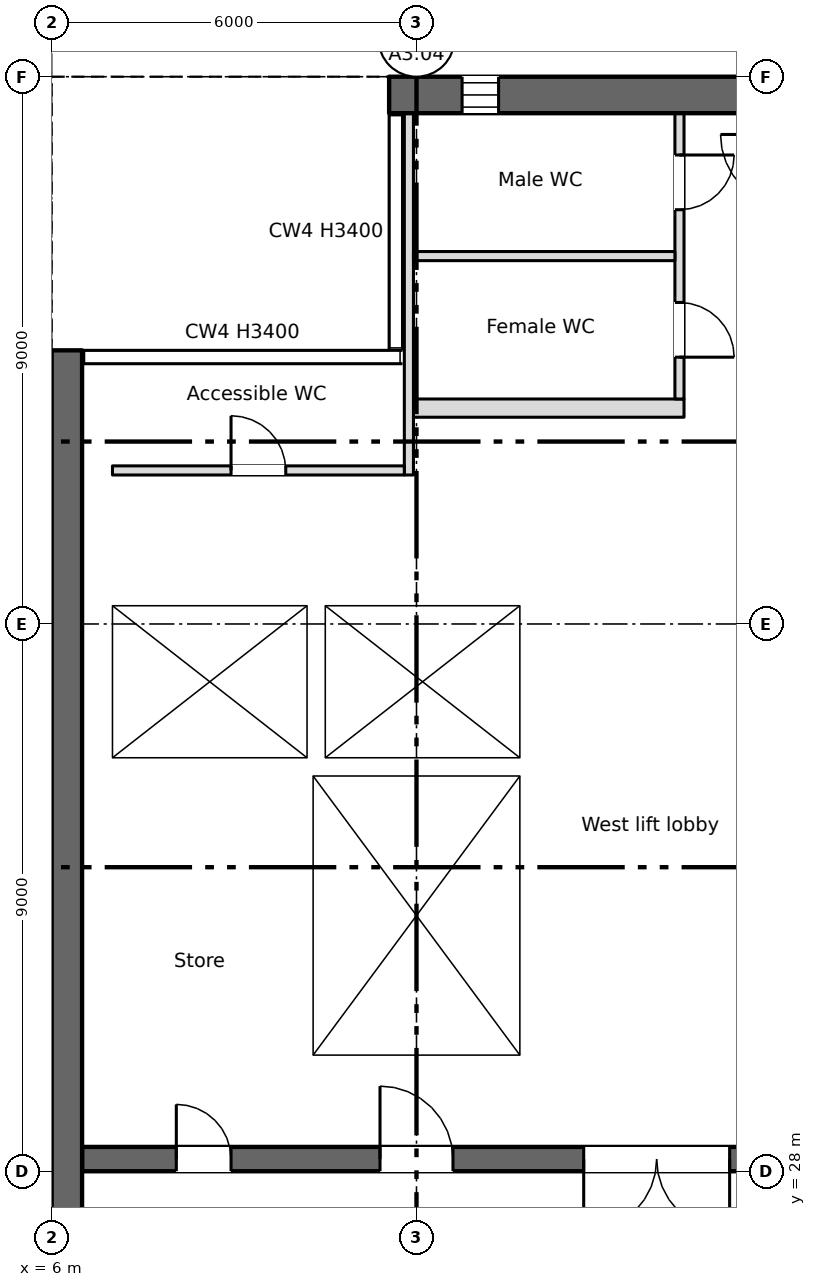
"""IFC4 building model, lengths in metres.
Left out: names, types, materials, properties, quantities, classifications, styles, units other than length and angle.
Written with IfcOpenShell. Run it as: python <this file> out.ifc"""

import sys

from ifc_helpers import new_model, si_unit, direction, frame, frame_2d, origin, place, context, subcontext, project, spatial, rectangle, extrude, element, fill, save


model = new_model("IFC4")
c1 = context("Model", 3, precision=1e-05, world=origin(), true_north=direction((0.0, 1.0)))
c2 = subcontext(c1, "Body", "Model", "MODEL_VIEW")
j1 = project(units=[si_unit("LENGTHUNIT", "METRE"), si_unit("PLANEANGLEUNIT", "RADIAN")], contexts=[c1])
p1 = place(None, origin())
s1 = spatial("IfcSite", under=j1, at=p1, CompositionType="ELEMENT")
p2 = place(p1, origin())
s2 = spatial("IfcBuilding", under=s1, at=p2, CompositionType="ELEMENT")
p3 = place(p2, frame((0.0, 0.0, 246.95)))
s3 = spatial("IfcBuildingStorey", under=s2, at=p3, CompositionType="ELEMENT", Elevation=246.95)
p4 = place(p3, frame((6.25, 8.5, 0.0), z_axis=(0.0, 0.0, 1.0), x_axis=(0.0, 1.0, 0.0)))
e1 = element("IfcWall", 1, at=p4, inside=s3, PredefinedType="SHEAR", context=c2, shape_type="SweptSolid", body=[
    extrude(rectangle(XDim=33.0, YDim=0.5, at=frame_2d((16.5, 0.0))), origin(), (0.0, 0.0, 1.0), 3.4),
])
p5 = place(p4, frame((1.2, 0.0, 0.6)))
e2 = element("IfcOpeningElement", 2, at=p5, cuts=e1, PredefinedType="OPENING", context=c2, shape_type="SweptSolid", body=[
    extrude(rectangle(XDim=0.6, YDim=2.4, at=frame_2d((0.3, 1.2))), frame((0.0, 0.26, 0.0), z_axis=(0.0, -1.0, 0.0), x_axis=(1.0, 0.0, 0.0)), (0.0, 0.0, 1.0), 0.52),
])
p6 = place(p4, frame((7.2, 0.0, 0.6)))
e3 = element("IfcOpeningElement", 3, at=p6, cuts=e1, PredefinedType="OPENING", context=c2, shape_type="SweptSolid", body=[
    extrude(rectangle(XDim=0.6, YDim=2.4, at=frame_2d((0.3, 1.2))), frame((0.0, 0.26, 0.0), z_axis=(0.0, -1.0, 0.0), x_axis=(1.0, 0.0, 0.0)), (0.0, 0.0, 1.0), 0.52),
])
p7 = place(p4, frame((13.2, 0.0, 0.6)))
e4 = element("IfcOpeningElement", 4, at=p7, cuts=e1, PredefinedType="OPENING", context=c2, shape_type="SweptSolid", body=[
    extrude(rectangle(XDim=0.6, YDim=2.4, at=frame_2d((0.3, 1.2))), frame((0.0, 0.26, 0.0), z_axis=(0.0, -1.0, 0.0), x_axis=(1.0, 0.0, 0.0)), (0.0, 0.0, 1.0), 0.52),
])
p8 = place(p3, frame((11.55, 45.7, 0.0), z_axis=(0.0, 0.0, 1.0), x_axis=(1.0, 0.0, 0.0)))
e5 = element("IfcWall", 5, at=p8, inside=s3, PredefinedType="SHEAR", context=c2, shape_type="SweptSolid", body=[
    extrude(rectangle(XDim=48.9, YDim=0.6, at=frame_2d((24.45, 0.0))), origin(), (0.0, 0.0, 1.0), 3.4),
])
p9 = place(p8, frame((1.2, 0.0, 0.6)))
e6 = element("IfcOpeningElement", 6, at=p9, cuts=e5, PredefinedType="OPENING", context=c2, shape_type="SweptSolid", body=[
    extrude(rectangle(XDim=0.6, YDim=2.4, at=frame_2d((0.3, 1.2))), frame((0.0, 0.31, 0.0), z_axis=(0.0, -1.0, 0.0), x_axis=(1.0, 0.0, 0.0)), (0.0, 0.0, 1.0), 0.62),
])
p10 = place(p3, frame((6.5, 28.2, 0.0), z_axis=(0.0, 0.0, 1.0), x_axis=(1.0, 0.0, 0.0)))
e7 = element("IfcWall", 7, at=p10, inside=s3, PredefinedType="SHEAR", context=c2, shape_type="SweptSolid", body=[
    extrude(rectangle(XDim=58.0, YDim=0.4, at=frame_2d((29.0, 0.0))), origin(), (0.0, 0.0, 1.0), 3.4),
])
p11 = place(p10, frame((14.05, 0.0, 0.0)))
e8 = element("IfcOpeningElement", 8, at=p11, cuts=e7, PredefinedType="OPENING", context=c2, shape_type="SweptSolid", body=[
    extrude(rectangle(XDim=0.9, YDim=2.1, at=frame_2d((0.45, 1.05))), frame((0.0, 0.21, 0.0), z_axis=(0.0, -1.0, 0.0), x_axis=(1.0, 0.0, 0.0)), (0.0, 0.0, 1.0), 0.42),
])
p12 = place(p10, frame((48.762, 0.0, 0.0)))
e9 = element("IfcOpeningElement", 9, at=p12, cuts=e7, PredefinedType="OPENING", context=c2, shape_type="SweptSolid", body=[
    extrude(rectangle(XDim=0.9, YDim=2.1, at=frame_2d((0.45, 1.05))), frame((0.0, 0.21, 0.0), z_axis=(0.0, -1.0, 0.0), x_axis=(1.0, 0.0, 0.0)), (0.0, 0.0, 1.0), 0.42),
])
p13 = place(p10, frame((51.337, 0.0, 0.0)))
e10 = element("IfcOpeningElement", 10, at=p13, cuts=e7, PredefinedType="OPENING", context=c2, shape_type="SweptSolid", body=[
    extrude(rectangle(XDim=0.9, YDim=2.1, at=frame_2d((0.45, 1.05))), frame((0.0, 0.21, 0.0), z_axis=(0.0, -1.0, 0.0), x_axis=(1.0, 0.0, 0.0)), (0.0, 0.0, 1.0), 0.42),
])
p14 = place(p10, frame((1.55, 0.0, 0.0)))
e11 = element("IfcOpeningElement", 11, at=p14, cuts=e7, PredefinedType="OPENING", context=c2, shape_type="SweptSolid", body=[
    extrude(rectangle(XDim=0.9, YDim=2.1, at=frame_2d((0.45, 1.05))), frame((0.0, 0.21, 0.0), z_axis=(0.0, -1.0, 0.0), x_axis=(1.0, 0.0, 0.0)), (0.0, 0.0, 1.0), 0.42),
])
p15 = place(p10, frame((4.9, 0.0, 0.0)))
e12 = element("IfcOpeningElement", 12, at=p15, cuts=e7, PredefinedType="OPENING", context=c2, shape_type="SweptSolid", body=[
    extrude(rectangle(XDim=1.2, YDim=2.1, at=frame_2d((0.6, 1.05))), frame((0.0, 0.21, 0.0), z_axis=(0.0, -1.0, 0.0), x_axis=(1.0, 0.0, 0.0)), (0.0, 0.0, 1.0), 0.42),
])
p16 = place(p10, frame((31.9, 0.0, 0.0)))
e13 = element("IfcOpeningElement", 13, at=p16, cuts=e7, PredefinedType="OPENING", context=c2, shape_type="SweptSolid", body=[
    extrude(rectangle(XDim=1.2, YDim=2.1, at=frame_2d((0.6, 1.05))), frame((0.0, 0.21, 0.0), z_axis=(0.0, -1.0, 0.0), x_axis=(1.0, 0.0, 0.0)), (0.0, 0.0, 1.0), 0.42),
])
p17 = place(p10, frame((55.4, 0.0, 0.0)))
e14 = element("IfcOpeningElement", 14, at=p17, cuts=e7, PredefinedType="OPENING", context=c2, shape_type="SweptSolid", body=[
    extrude(rectangle(XDim=1.2, YDim=2.1, at=frame_2d((0.6, 1.05))), frame((0.0, 0.21, 0.0), z_axis=(0.0, -1.0, 0.0), x_axis=(1.0, 0.0, 0.0)), (0.0, 0.0, 1.0), 0.42),
])
p18 = place(p10, frame((21.9, 0.0, 0.0)))
e15 = element("IfcOpeningElement", 15, at=p18, cuts=e7, PredefinedType="OPENING", context=c2, shape_type="SweptSolid", body=[
    extrude(rectangle(XDim=1.2, YDim=2.1, at=frame_2d((0.6, 1.05))), frame((0.0, 0.21, 0.0), z_axis=(0.0, -1.0, 0.0), x_axis=(1.0, 0.0, 0.0)), (0.0, 0.0, 1.0), 0.42),
])
p19 = place(p10, frame((41.9, 0.0, 0.0)))
e16 = element("IfcOpeningElement", 16, at=p19, cuts=e7, PredefinedType="OPENING", context=c2, shape_type="SweptSolid", body=[
    extrude(rectangle(XDim=1.2, YDim=2.1, at=frame_2d((0.6, 1.05))), frame((0.0, 0.21, 0.0), z_axis=(0.0, -1.0, 0.0), x_axis=(1.0, 0.0, 0.0)), (0.0, 0.0, 1.0), 0.42),
])
p20 = place(p10, frame((25.05, 0.0, 0.0)))
e17 = element("IfcOpeningElement", 17, at=p20, cuts=e7, PredefinedType="OPENING", context=c2, shape_type="SweptSolid", body=[
    extrude(rectangle(XDim=2.4, YDim=2.1, at=frame_2d((1.2, 1.05))), frame((0.0, 0.21, 0.0), z_axis=(0.0, -1.0, 0.0), x_axis=(1.0, 0.0, 0.0)), (0.0, 0.0, 1.0), 0.42),
])
p21 = place(p10, frame((37.55, 0.0, 0.0)))
e18 = element("IfcOpeningElement", 18, at=p21, cuts=e7, PredefinedType="OPENING", context=c2, shape_type="SweptSolid", body=[
    extrude(rectangle(XDim=2.4, YDim=2.1, at=frame_2d((1.2, 1.05))), frame((0.0, 0.21, 0.0), z_axis=(0.0, -1.0, 0.0), x_axis=(1.0, 0.0, 0.0)), (0.0, 0.0, 1.0), 0.42),
])
p22 = place(p10, frame((8.25, 0.0, 0.0)))
e19 = element("IfcOpeningElement", 19, at=p22, cuts=e7, PredefinedType="OPENING", context=c2, shape_type="SweptSolid", body=[
    extrude(rectangle(XDim=2.4, YDim=2.1, at=frame_2d((1.2, 1.05))), frame((0.0, 0.21, 0.0), z_axis=(0.0, -1.0, 0.0), x_axis=(1.0, 0.0, 0.0)), (0.0, 0.0, 1.0), 0.42),
])
p23 = place(p10, frame((29.05, 0.0, 0.0)))
e20 = element("IfcOpeningElement", 20, at=p23, cuts=e7, PredefinedType="OPENING", context=c2, shape_type="SweptSolid", body=[
    extrude(rectangle(XDim=0.9, YDim=2.1, at=frame_2d((0.45, 1.05))), frame((0.0, 0.21, 0.0), z_axis=(0.0, -1.0, 0.0), x_axis=(1.0, 0.0, 0.0)), (0.0, 0.0, 1.0), 0.42),
])
p24 = place(p10, frame((35.05, 0.0, 0.0)))
e21 = element("IfcOpeningElement", 21, at=p24, cuts=e7, PredefinedType="OPENING", context=c2, shape_type="SweptSolid", body=[
    extrude(rectangle(XDim=0.9, YDim=2.1, at=frame_2d((0.45, 1.05))), frame((0.0, 0.21, 0.0), z_axis=(0.0, -1.0, 0.0), x_axis=(1.0, 0.0, 0.0)), (0.0, 0.0, 1.0), 0.42),
])
p25 = place(p3, frame((6.75, 28.4, 0.0), z_axis=(0.0, 0.0, 1.0), x_axis=(0.0, 1.0, 0.0)))
e22 = element("IfcWall", 22, at=p25, inside=s3, PredefinedType="SHEAR", context=c2, shape_type="SweptSolid", body=[
    extrude(rectangle(XDim=12.85, YDim=0.5, at=frame_2d((6.425, 0.0))), origin(), (0.0, 0.0, 1.0), 3.4),
])
for number, where, z_axis, x_axis in (
    (23, (10.15, 28.4, 0.0), (0.0, 0.0, 1.0), (0.0, 1.0, 0.0)),
    (24, (13.85, 28.4, 0.0), (0.0, 0.0, 1.0), (0.0, 1.0, 0.0)),
):
    element("IfcWall", number, at=place(p3, frame(where, z_axis=z_axis, x_axis=x_axis)), inside=s3, PredefinedType="SHEAR", context=c2, shape_type="SweptSolid", body=[
        extrude(rectangle(XDim=6.1, YDim=0.3, at=frame_2d((3.05, 0.0))), origin(), (0.0, 0.0, 1.0), 3.4),
    ])
p26 = place(p3, frame((7.0, 34.65, 0.0), z_axis=(0.0, 0.0, 1.0), x_axis=(1.0, 0.0, 0.0)))
e25 = element("IfcWall", 25, at=p26, inside=s3, PredefinedType="SHEAR", context=c2, shape_type="SweptSolid", body=[
    extrude(rectangle(XDim=7.0, YDim=0.3, at=frame_2d((3.5, 0.0))), origin(), (0.0, 0.0, 1.0), 3.4),
])
p27 = place(p3, frame((7.0, 37.45, 0.0), z_axis=(0.0, 0.0, 1.0), x_axis=(1.0, 0.0, 0.0)))
e26 = element("IfcWall", 26, at=p27, inside=s3, PredefinedType="SHEAR", context=c2, shape_type="SweptSolid", body=[
    extrude(rectangle(XDim=7.0, YDim=0.3, at=frame_2d((3.5, 0.0))), origin(), (0.0, 0.0, 1.0), 3.4),
])
p28 = place(p27, frame((1.05, 0.0, 0.0)))
e27 = element("IfcOpeningElement", 27, at=p28, cuts=e26, PredefinedType="OPENING", context=c2, shape_type="SweptSolid", body=[
    extrude(rectangle(XDim=1.1, YDim=2.1, at=frame_2d((0.55, 1.05))), frame((0.0, 0.16, 0.0), z_axis=(0.0, -1.0, 0.0), x_axis=(1.0, 0.0, 0.0)), (0.0, 0.0, 1.0), 0.32),
])
p29 = place(p27, frame((4.55, 0.0, 0.0)))
e28 = element("IfcOpeningElement", 28, at=p29, cuts=e26, PredefinedType="OPENING", context=c2, shape_type="SweptSolid", body=[
    extrude(rectangle(XDim=1.1, YDim=2.1, at=frame_2d((0.55, 1.05))), frame((0.0, 0.16, 0.0), z_axis=(0.0, -1.0, 0.0), x_axis=(1.0, 0.0, 0.0)), (0.0, 0.0, 1.0), 0.32),
])
p30 = place(p3, frame((13.85, 34.8, 0.0), z_axis=(0.0, 0.0, 1.0), x_axis=(0.0, 1.0, 0.0)))
e29 = element("IfcWall", 29, at=p30, inside=s3, PredefinedType="SHEAR", context=c2, shape_type="SweptSolid", body=[
    extrude(rectangle(XDim=2.5, YDim=0.3, at=frame_2d((1.25, 0.0))), origin(), (0.0, 0.0, 1.0), 3.4),
])
p31 = place(p3, frame((11.95, 40.55, 0.0), z_axis=(0.0, 0.0, 1.0), x_axis=(1.0, 0.0, 0.0)))
e30 = element("IfcWall", 30, at=p31, inside=s3, PredefinedType="PARTITIONING", context=c2, shape_type="SweptSolid", body=[
    extrude(rectangle(XDim=4.45, YDim=0.3, at=frame_2d((2.225, 0.0))), origin(), (0.0, 0.0, 1.0), 3.4),
])
p32 = place(p3, frame((10.35, 34.8, 0.0), z_axis=(0.0, 0.0, 1.0), x_axis=(0.0, 1.0, 0.0)))
e31 = element("IfcWall", 31, at=p32, inside=s3, PredefinedType="SHEAR", context=c2, shape_type="SweptSolid", body=[
    extrude(rectangle(XDim=2.5, YDim=0.3, at=frame_2d((1.25, 0.0))), origin(), (0.0, 0.0, 1.0), 3.4),
])
p33 = place(p3, frame((16.325, 45.4, 0.0), z_axis=(0.0, 0.0, 1.0), x_axis=(0.0, -1.0, 0.0)))
e32 = element("IfcWall", 32, at=p33, inside=s3, PredefinedType="PARTITIONING", context=c2, shape_type="SweptSolid", body=[
    extrude(rectangle(XDim=4.7, YDim=0.15, at=frame_2d((2.35, 0.0))), origin(), (0.0, 0.0, 1.0), 3.4),
])
p34 = place(p33, frame((3.113, 0.0, 0.0)))
e33 = element("IfcOpeningElement", 33, at=p34, cuts=e32, PredefinedType="OPENING", context=c2, shape_type="SweptSolid", body=[
    extrude(rectangle(XDim=0.9, YDim=2.1, at=frame_2d((0.45, 1.05))), frame((0.0, 0.085, 0.0), z_axis=(0.0, -1.0, 0.0), x_axis=(1.0, 0.0, 0.0)), (0.0, 0.0, 1.0), 0.17),
])
p35 = place(p33, frame((0.688, 0.0, 0.0)))
e34 = element("IfcOpeningElement", 34, at=p35, cuts=e32, PredefinedType="OPENING", context=c2, shape_type="SweptSolid", body=[
    extrude(rectangle(XDim=0.9, YDim=2.1, at=frame_2d((0.45, 1.05))), frame((0.0, 0.085, 0.0), z_axis=(0.0, -1.0, 0.0), x_axis=(1.0, 0.0, 0.0)), (0.0, 0.0, 1.0), 0.17),
])
p36 = place(p3, frame((11.875, 39.45, 0.0), z_axis=(0.0, 0.0, 1.0), x_axis=(0.0, 1.0, 0.0)))
e35 = element("IfcWall", 35, at=p36, inside=s3, PredefinedType="PARTITIONING", context=c2, shape_type="SweptSolid", body=[
    extrude(rectangle(XDim=5.95, YDim=0.15, at=frame_2d((2.975, 0.0))), origin(), (0.0, 0.0, 1.0), 3.4),
])
p37 = place(p3, frame((7.0, 39.525, 0.0), z_axis=(0.0, 0.0, 1.0), x_axis=(1.0, 0.0, 0.0)))
e36 = element("IfcWall", 36, at=p37, inside=s3, PredefinedType="PARTITIONING", context=c2, shape_type="SweptSolid", body=[
    extrude(rectangle(XDim=4.8, YDim=0.15, at=frame_2d((2.4, 0.0))), origin(), (0.0, 0.0, 1.0), 3.4),
])
p38 = place(p37, frame((1.95, 0.0, 0.0)))
e37 = element("IfcOpeningElement", 37, at=p38, cuts=e36, PredefinedType="OPENING", context=c2, shape_type="SweptSolid", body=[
    extrude(rectangle(XDim=0.9, YDim=2.1, at=frame_2d((0.45, 1.05))), frame((0.0, 0.085, 0.0), z_axis=(0.0, -1.0, 0.0), x_axis=(1.0, 0.0, 0.0)), (0.0, 0.0, 1.0), 0.17),
])
p39 = place(p3, frame((11.95, 43.05, 0.0), z_axis=(0.0, 0.0, 1.0), x_axis=(1.0, 0.0, 0.0)))
e38 = element("IfcWall", 38, at=p39, inside=s3, PredefinedType="PARTITIONING", context=c2, shape_type="SweptSolid", body=[
    extrude(rectangle(XDim=4.3, YDim=0.15, at=frame_2d((2.15, 0.0))), origin(), (0.0, 0.0, 1.0), 3.4),
])
p40 = place(p9, origin())
e39 = element("IfcWindow", 39, at=p40, inside=s3, PartitioningType="SINGLE_PANEL", PredefinedType="WINDOW", context=c2, shape_type="SweptSolid", body=[
    extrude(rectangle(XDim=0.6, YDim=2.4, at=frame_2d((0.3, 1.2))), frame((0.0, 0.03, 0.0), z_axis=(0.0, -1.0, 0.0), x_axis=(1.0, 0.0, 0.0)), (0.0, 0.0, 1.0), 0.06),
])
fill(e6, e39)
p41 = place(p14, origin())
e40 = element("IfcDoor", 40, at=p41, inside=s3, OperationType="SINGLE_SWING_LEFT", PredefinedType="DOOR", context=c2, shape_type="SweptSolid", body=[
    extrude(rectangle(XDim=0.9, YDim=2.1, at=frame_2d((0.45, 1.05))), frame((0.0, 0.025, 0.0), z_axis=(0.0, -1.0, 0.0), x_axis=(1.0, 0.0, 0.0)), (0.0, 0.0, 1.0), 0.05),
])
fill(e11, e40)
p42 = place(p38, origin())
e41 = element("IfcDoor", 41, at=p42, inside=s3, OperationType="SINGLE_SWING_LEFT", PredefinedType="DOOR", context=c2, shape_type="SweptSolid", body=[
    extrude(rectangle(XDim=0.9, YDim=2.1, at=frame_2d((0.45, 1.05))), frame((0.0, 0.025, 0.0), z_axis=(0.0, -1.0, 0.0), x_axis=(1.0, 0.0, 0.0)), (0.0, 0.0, 1.0), 0.05),
])
fill(e37, e41)
p43 = place(p34, origin())
e42 = element("IfcDoor", 42, at=p43, inside=s3, OperationType="SINGLE_SWING_RIGHT", PredefinedType="DOOR", context=c2, shape_type="SweptSolid", body=[
    extrude(rectangle(XDim=0.9, YDim=2.1, at=frame_2d((0.45, 1.05))), frame((0.0, 0.025, 0.0), z_axis=(0.0, -1.0, 0.0), x_axis=(1.0, 0.0, 0.0)), (0.0, 0.0, 1.0), 0.05),
])
fill(e33, e42)
p44 = place(p35, origin())
e43 = element("IfcDoor", 43, at=p44, inside=s3, OperationType="SINGLE_SWING_LEFT", PredefinedType="DOOR", context=c2, shape_type="SweptSolid", body=[
    extrude(rectangle(XDim=0.9, YDim=2.1, at=frame_2d((0.45, 1.05))), frame((0.0, 0.025, 0.0), z_axis=(0.0, -1.0, 0.0), x_axis=(1.0, 0.0, 0.0)), (0.0, 0.0, 1.0), 0.05),
])
fill(e34, e43)
p45 = place(p28, origin())
e44 = element("IfcDoor", 44, at=p45, inside=s3, OperationType="SLIDING_TO_LEFT", PredefinedType="DOOR", context=c2, shape_type="SweptSolid", body=[
    extrude(rectangle(XDim=1.1, YDim=2.1, at=frame_2d((0.55, 1.05))), frame((0.0, 0.025, 0.0), z_axis=(0.0, -1.0, 0.0), x_axis=(1.0, 0.0, 0.0)), (0.0, 0.0, 1.0), 0.05),
])
fill(e27, e44)
p46 = place(p29, origin())
e45 = element("IfcDoor", 45, at=p46, inside=s3, OperationType="SLIDING_TO_LEFT", PredefinedType="DOOR", context=c2, shape_type="SweptSolid", body=[
    extrude(rectangle(XDim=1.1, YDim=2.1, at=frame_2d((0.55, 1.05))), frame((0.0, 0.025, 0.0), z_axis=(0.0, -1.0, 0.0), x_axis=(1.0, 0.0, 0.0)), (0.0, 0.0, 1.0), 0.05),
])
fill(e28, e45)
p47 = place(p15, origin())
e46 = element("IfcDoor", 46, at=p47, inside=s3, OperationType="SINGLE_SWING_LEFT", PredefinedType="DOOR", context=c2, shape_type="SweptSolid", body=[
    extrude(rectangle(XDim=1.2, YDim=2.1, at=frame_2d((0.6, 1.05))), frame((0.0, 0.025, 0.0), z_axis=(0.0, -1.0, 0.0), x_axis=(1.0, 0.0, 0.0)), (0.0, 0.0, 1.0), 0.05),
])
fill(e12, e46)
p48 = place(p22, origin())
e47 = element("IfcDoor", 47, at=p48, inside=s3, OperationType="DOUBLE_DOOR_SINGLE_SWING", PredefinedType="DOOR", context=c2, shape_type="SweptSolid", body=[
    extrude(rectangle(XDim=2.4, YDim=2.1, at=frame_2d((1.2, 1.05))), frame((0.0, 0.025, 0.0), z_axis=(0.0, -1.0, 0.0), x_axis=(1.0, 0.0, 0.0)), (0.0, 0.0, 1.0), 0.05),
])
fill(e19, e47)
save(model, sys.argv[1])
